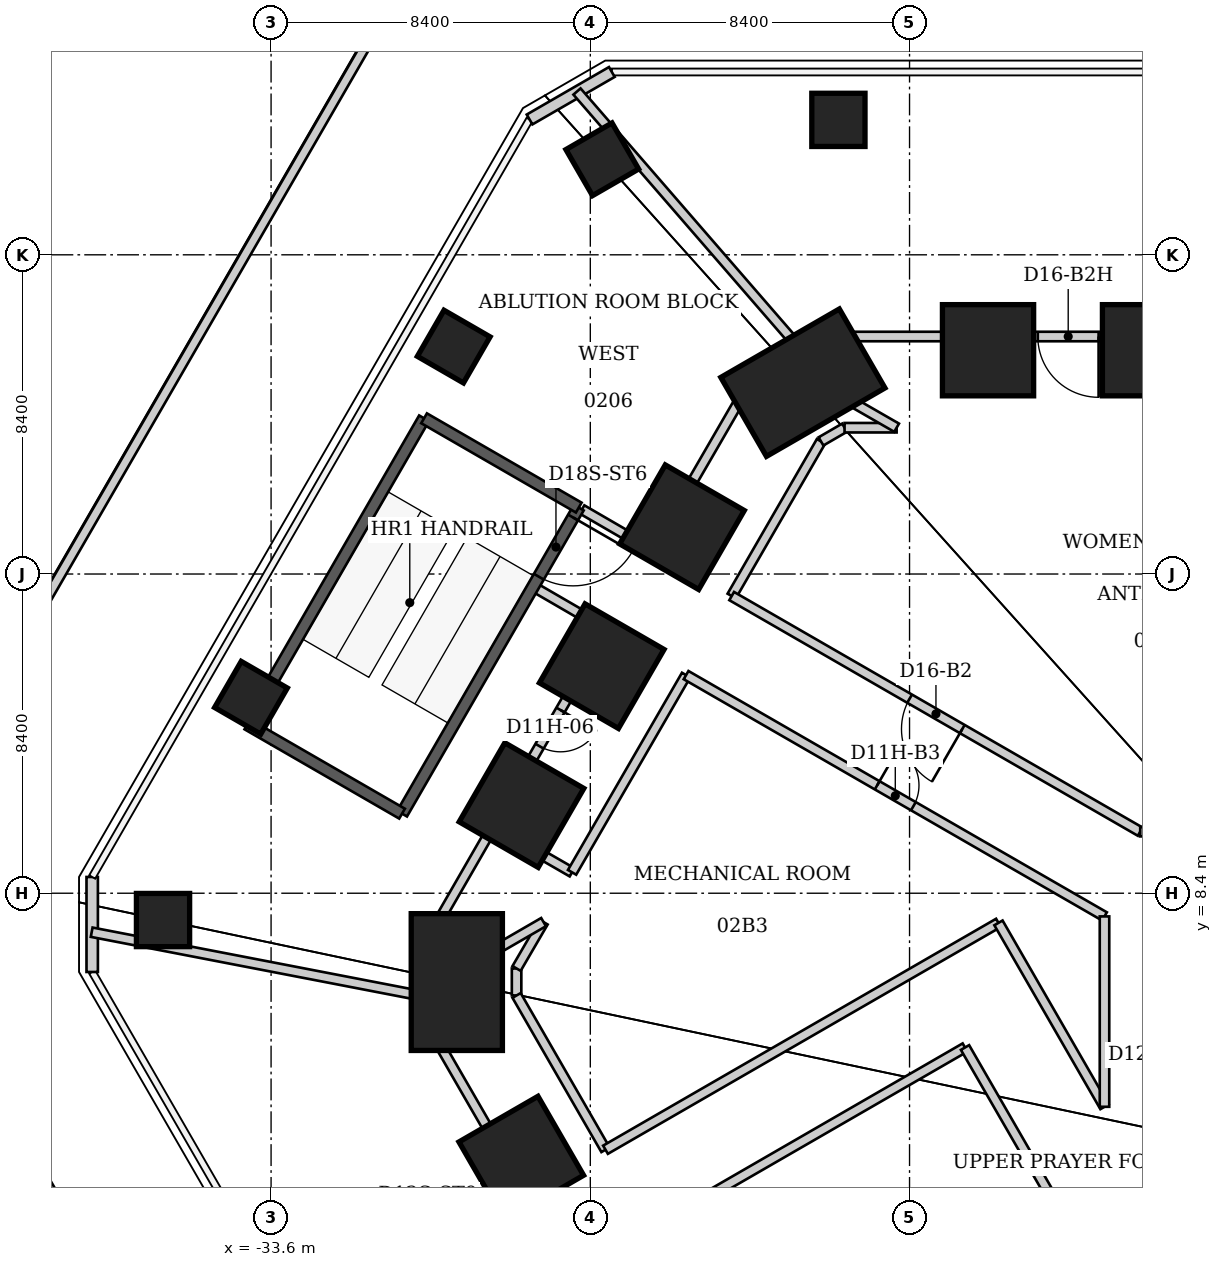
"""IFC4 building model, lengths in metres.
Left out: names, types, materials, properties, quantities, classifications, styles, units other than length and angle.
Written with IfcOpenShell. Run it as: python <this file> out.ifc"""

import sys

from ifc_helpers import new_model, si_unit, direction, frame, frame_2d, origin, origin_2d, place, context, subcontext, project, spatial, rectangle, extrude, element, fill, save


model = new_model("IFC4")
c1 = context("Model", 3, precision=1e-05, world=origin(), true_north=direction((0.0, 1.0)))
c2 = subcontext(c1, "Body", "Model", "MODEL_VIEW")
j1 = project(units=[si_unit("LENGTHUNIT", "METRE"), si_unit("PLANEANGLEUNIT", "RADIAN")], contexts=[c1])
p1 = place(None, origin())
s1 = spatial("IfcSite", under=j1, at=p1, CompositionType="ELEMENT")
p2 = place(p1, origin())
s2 = spatial("IfcBuilding", under=s1, at=p2, CompositionType="ELEMENT")
p3 = place(p2, frame((0.0, 0.0, 12.0)))
s3 = spatial("IfcBuildingStorey", under=s2, at=p3, CompositionType="ELEMENT", Elevation=12.0)
for number, where, z_axis, x_axis in (
    (1, (-14.735, 22.689, 0.0), (0.0, 0.0, 1.0), (0.0, 1.0, 0.0)),
    (2, (-10.525, 22.689, 0.0), (0.0, 0.0, 1.0), (0.0, 1.0, 0.0)),
    (3, (-27.016, 1.416, 0.0), (0.0, 0.0, 1.0), (-0.866, -0.5, 0.0)),
):
    element("IfcColumn", number, at=place(p3, frame(where, z_axis=z_axis, x_axis=x_axis)), inside=s3, PredefinedType="COLUMN", context=c2, shape_type="SweptSolid", body=[
        extrude(rectangle(XDim=2.4, YDim=2.4, at=origin_2d()), origin(), (0.0, 0.0, 1.0), 6.0),
    ])
p4 = place(p3, frame((-28.713, 6.062, 0.0), z_axis=(0.0, 0.0, 1.0), x_axis=(-1.0, 0.0, 0.0)))
e4 = element("IfcColumn", 4, at=p4, inside=s3, PredefinedType="COLUMN", context=c2, shape_type="SweptSolid", body=[
    extrude(rectangle(XDim=2.4, YDim=3.6, at=origin_2d()), origin(), (0.0, 0.0, 1.0), 6.0),
])
for number, where, z_axis, x_axis in (
    (5, (-27.01, 10.719, 0.0), (0.0, 0.0, 1.0), (-0.866, 0.5, 0.0)),
    (6, (-24.899, 14.375, 0.0), (0.0, 0.0, 1.0), (-0.866, 0.5, 0.0)),
    (7, (-22.788, 18.032, 0.0), (0.0, 0.0, 1.0), (-0.866, 0.5, 0.0)),
):
    element("IfcColumn", number, at=place(p3, frame(where, z_axis=z_axis, x_axis=x_axis)), inside=s3, PredefinedType="COLUMN", context=c2, shape_type="SweptSolid", body=[
        extrude(rectangle(XDim=2.4, YDim=2.4, at=origin_2d()), origin(), (0.0, 0.0, 1.0), 6.0),
    ])
p5 = place(p3, frame((-19.606, 21.835, 0.0), z_axis=(0.0, 0.0, 1.0), x_axis=(-0.5, 0.866025403784, 0.0)))
e8 = element("IfcColumn", 8, at=p5, inside=s3, PredefinedType="COLUMN", context=c2, shape_type="SweptSolid", body=[
    extrude(rectangle(XDim=2.4, YDim=3.6, at=origin_2d()), origin(), (0.0, 0.0, 1.0), 6.0),
])
for number, where, z_axis, x_axis in (
    (9, (-18.672, 28.751, 0.0), (0.0, 0.0, 1.0), (0.0, 1.0, 0.0)),
    (10, (-36.443, 7.694, 0.0), (0.0, 0.0, 1.0), (-1.0, 0.0, 0.0)),
    (11, (-34.129, 13.544, 0.0), (0.0, 0.0, 1.0), (-0.866, 0.5, 0.0)),
    (12, (-28.794, 22.785, 0.0), (0.0, 0.0, 1.0), (-0.866, 0.5, 0.0)),
    (13, (-24.885, 27.714, 0.0), (0.0, 0.0, 1.0), (-0.5, 0.866, 0.0)),
):
    element("IfcColumn", number, at=place(p3, frame(where, z_axis=z_axis, x_axis=x_axis)), inside=s3, PredefinedType="COLUMN", context=c2, shape_type="SweptSolid", body=[
        extrude(rectangle(XDim=1.4, YDim=1.4, at=origin_2d()), origin(), (0.0, 0.0, 1.0), 6.0),
    ])
p6 = place(p3, frame((-38.307, 6.328, 0.0), z_axis=(0.0, 0.0, 1.0), x_axis=(0.0, 1.0, 0.0)))
e14 = element("IfcWall", 14, at=p6, inside=s3, PredefinedType="SOLIDWALL", context=c2, shape_type="SweptSolid", body=[
    extrude(rectangle(XDim=2.5, YDim=0.3, at=frame_2d((1.25, 0.0))), origin(), (0.0, 0.0, 1.0), 5.6),
])
p7 = place(p3, frame((-26.799, 28.761, 0.0), z_axis=(0.0, 0.0, 1.0), x_axis=(0.866047370643, 0.499961950354, 0.0)))
e15 = element("IfcWall", 15, at=p7, inside=s3, PredefinedType="SOLIDWALL", context=c2, shape_type="SweptSolid", body=[
    extrude(rectangle(XDim=2.5, YDim=0.3, at=frame_2d((1.25, 0.0))), origin(), (0.0, 0.0, 1.0), 5.6),
])
p8 = place(p3, frame((-30.106, 32.438, 0.0), z_axis=(0.0, 0.0, 1.0), x_axis=(-0.500004465561, -0.866022825576, 0.0)))
e16 = element("IfcWall", 16, at=p8, inside=s3, PredefinedType="PARAPET", context=c2, shape_type="SweptSolid", body=[
    extrude(rectangle(XDim=26.078, YDim=0.25, at=frame_2d((13.039, 0.0))), origin(), (0.0, 0.0, 1.0), 1.1),
])
p9 = place(p3, frame((-43.144, 7.063, 0.0), z_axis=(0.0, 0.0, 1.0), x_axis=(0.500000660882, -0.866025022224, 0.0)))
e17 = element("IfcWall", 17, at=p9, inside=s3, PredefinedType="PARAPET", context=c2, shape_type="SweptSolid", body=[
    extrude(rectangle(XDim=55.377, YDim=0.25, at=frame_2d((27.688, 0.0))), origin(), (0.0, 0.0, 1.0), 1.1),
])
p10 = place(p3, frame((-38.321, 7.374, 0.0), z_axis=(0.0, 0.0, 1.0), x_axis=(0.981886490476, -0.189470102708, 0.0)))
e18 = element("IfcWall", 18, at=p10, inside=s3, PredefinedType="PARTITIONING", context=c2, shape_type="SweptSolid", body=[
    extrude(rectangle(XDim=8.942, YDim=0.25, at=frame_2d((4.471, 0.0))), origin(), (0.0, 0.0, 1.0), 5.6),
])
p11 = place(p3, frame((-29.54, 5.06, 0.0), z_axis=(0.0, 0.0, 1.0), x_axis=(0.499789957473, -0.866146637937, 0.0)))
e19 = element("IfcWall", 19, at=p11, inside=s3, PredefinedType="PARTITIONING", context=c2, shape_type="SweptSolid", body=[
    extrude(rectangle(XDim=5.323, YDim=0.25, at=frame_2d((2.661, 0.0))), origin(), (0.0, 0.0, 1.0), 4.04),
])
p12 = place(p3, frame((-29.54, 5.645, 0.0), z_axis=(0.0, 0.0, 1.0), x_axis=(0.0, -1.0, 0.0)))
e20 = element("IfcWall", 20, at=p12, inside=s3, PredefinedType="PARTITIONING", context=c2, shape_type="SweptSolid", body=[
    extrude(rectangle(XDim=0.585, YDim=0.25, at=frame_2d((0.292, 0.0))), origin(), (0.0, 0.0, 1.0), 5.84),
])
p13 = place(p3, frame((-29.54, 7.06, 0.0), z_axis=(0.0, 0.0, 1.0), x_axis=(0.0, -1.0, 0.0)))
e21 = element("IfcWall", 21, at=p13, inside=s3, PredefinedType="PARTITIONING", context=c2, shape_type="SweptSolid", body=[
    extrude(rectangle(XDim=1.22, YDim=0.25, at=frame_2d((0.61, 0.0))), origin(), (0.0, 0.0, 1.0), 5.84),
])
p14 = place(p3, frame((-27.76, 10.15, 0.0), z_axis=(0.0, 0.0, 1.0), x_axis=(-0.499181015942, -0.8664977284, 0.0)))
e22 = element("IfcWall", 22, at=p14, inside=s3, PredefinedType="PARTITIONING", context=c2, shape_type="SweptSolid", body=[
    extrude(rectangle(XDim=3.566, YDim=0.25, at=frame_2d((1.783, 0.0))), origin(), (0.0, 0.0, 1.0), 5.84),
])
p15 = place(p3, frame((-27.76, 10.15, 0.0), z_axis=(0.0, 0.0, 1.0), x_axis=(0.866202511239, -0.499693115345, 0.0)))
e23 = element("IfcWall", 23, at=p15, inside=s3, PredefinedType="PARTITIONING", context=c2, shape_type="SweptSolid", body=[
    extrude(rectangle(XDim=2.401, YDim=0.25, at=frame_2d((1.201, 0.0))), origin(), (0.0, 0.0, 1.0), 5.84),
])
p16 = place(p3, frame((-27.14, 5.71, 0.0), z_axis=(0.0, 0.0, 1.0), x_axis=(0.0, 1.0, 0.0)))
e24 = element("IfcWall", 24, at=p16, inside=s3, PredefinedType="PARTITIONING", context=c2, shape_type="SweptSolid", body=[
    extrude(rectangle(XDim=0.71, YDim=0.25, at=frame_2d((0.355, 0.0))), origin(), (0.0, 0.0, 1.0), 5.84),
])
p17 = place(p3, frame((-27.14, 6.42, 0.0), z_axis=(0.0, 0.0, 1.0), x_axis=(0.502902974743, 0.864342870622, 0.0)))
e25 = element("IfcWall", 25, at=p17, inside=s3, PredefinedType="PARTITIONING", context=c2, shape_type="SweptSolid", body=[
    extrude(rectangle(XDim=1.412, YDim=0.25, at=frame_2d((0.706, 0.0))), origin(), (0.0, 0.0, 1.0), 5.84),
])
p18 = place(p3, frame((-26.62, 16.42, 0.0), z_axis=(0.0, 0.0, 1.0), x_axis=(0.864835053767, -0.50205610222, 0.0)))
e26 = element("IfcWall", 26, at=p18, inside=s3, PredefinedType="PARTITIONING", context=c2, shape_type="SweptSolid", body=[
    extrude(rectangle(XDim=2.151, YDim=0.25, at=frame_2d((1.075, 0.0))), origin(), (0.0, 0.0, 1.0), 5.6),
])
p19 = place(p3, frame((-26.43, 7.64, 0.0), z_axis=(0.0, 0.0, 1.0), x_axis=(-0.865520854062, -0.500872889249, 0.0)))
e27 = element("IfcWall", 27, at=p19, inside=s3, PredefinedType="PARTITIONING", context=c2, shape_type="SweptSolid", body=[
    extrude(rectangle(XDim=3.593, YDim=0.25, at=frame_2d((1.797, 0.0))), origin(), (0.0, 0.0, 1.0), 5.84),
])
p20 = place(p3, frame((-25.68, 8.95, 0.0), z_axis=(0.0, 0.0, 1.0), x_axis=(0.50043093139, 0.865776462436, 0.0)))
e28 = element("IfcWall", 28, at=p20, inside=s3, PredefinedType="PARTITIONING", context=c2, shape_type="SweptSolid", body=[
    extrude(rectangle(XDim=5.995, YDim=0.25, at=frame_2d((2.998, 0.0))), origin(), (0.0, 0.0, 1.0), 5.84),
])
p21 = place(p3, frame((-24.8, 1.65, 0.0), z_axis=(0.0, 0.0, 1.0), x_axis=(-0.499361596599, 0.866393672555, 0.0)))
e29 = element("IfcWall", 29, at=p21, inside=s3, PredefinedType="PARTITIONING", context=c2, shape_type="SweptSolid", body=[
    extrude(rectangle(XDim=4.686, YDim=0.25, at=frame_2d((2.343, 0.0))), origin(), (0.0, 0.0, 1.0), 5.84),
])
p22 = place(p3, frame((-24.76, 15.34, 0.0), z_axis=(0.0, 0.0, 1.0), x_axis=(-0.50043093139, -0.865776462436, 0.0)))
e30 = element("IfcWall", 30, at=p22, inside=s3, PredefinedType="PARTITIONING", context=c2, shape_type="SweptSolid", body=[
    extrude(rectangle(XDim=5.995, YDim=0.25, at=frame_2d((2.998, 0.0))), origin(), (0.0, 0.0, 1.0), 4.04),
])
p23 = place(p22, frame((2.448, 0.0, 0.0)))
e31 = element("IfcOpeningElement", 31, at=p23, cuts=e30, PredefinedType="OPENING", context=c2, shape_type="SweptSolid", body=[
    extrude(rectangle(XDim=1.1, YDim=2.2, at=frame_2d((0.55, 1.1))), frame((0.0, 0.125, 0.0), z_axis=(0.0, -1.0, 0.0), x_axis=(1.0, 0.0, 0.0)), (0.0, 0.0, 1.0), 0.25),
])
p24 = place(p3, frame((-23.6, -0.43, 0.0), z_axis=(0.0, 0.0, 1.0), x_axis=(0.865975432538, 0.500086542752, 0.0)))
e32 = element("IfcWall", 32, at=p24, inside=s3, PredefinedType="PARTITIONING", context=c2, shape_type="SweptSolid", body=[
    extrude(rectangle(XDim=9.538, YDim=0.25, at=frame_2d((4.769, 0.0))), origin(), (0.0, 0.0, 1.0), 5.84),
])
p25 = place(p3, frame((-23.56, 17.42, 0.0), z_axis=(0.0, 0.0, 1.0), x_axis=(-0.864757143013, 0.502190286255, 0.0)))
e33 = element("IfcWall", 33, at=p25, inside=s3, PredefinedType="PARTITIONING", context=c2, shape_type="SweptSolid", body=[
    extrude(rectangle(XDim=2.151, YDim=0.25, at=frame_2d((1.075, 0.0))), origin(), (0.0, 0.0, 1.0), 5.6),
])
p26 = place(p3, frame((-22.68, 14.14, 0.0), z_axis=(0.0, 0.0, 1.0), x_axis=(0.866256251028, -0.499599947513, 0.0)))
e34 = element("IfcWall", 34, at=p26, inside=s3, PredefinedType="PARTITIONING", context=c2, shape_type="SweptSolid", body=[
    extrude(rectangle(XDim=12.71, YDim=0.25, at=frame_2d((6.355, 0.0))), origin(), (0.0, 0.0, 1.0), 5.84),
])
p27 = place(p26, frame((5.805, 0.0, 0.0)))
e35 = element("IfcOpeningElement", 35, at=p27, cuts=e34, PredefinedType="OPENING", context=c2, shape_type="SweptSolid", body=[
    extrude(rectangle(XDim=1.1, YDim=2.2, at=frame_2d((0.55, 1.1))), frame((0.0, 0.125, 0.0), z_axis=(0.0, -1.0, 0.0), x_axis=(1.0, 0.0, 0.0)), (0.0, 0.0, 1.0), 0.25),
])
p28 = place(p3, frame((-21.48, 16.22, 0.0), z_axis=(0.0, 0.0, 1.0), x_axis=(0.499999753078, 0.866025546345, 0.0)))
e36 = element("IfcWall", 36, at=p28, inside=s3, PredefinedType="PARTITIONING", context=c2, shape_type="SweptSolid", body=[
    extrude(rectangle(XDim=4.7, YDim=0.25, at=frame_2d((2.35, 0.0))), origin(), (0.0, 0.0, 1.0), 5.84),
])
p29 = place(p3, frame((-20.88, 22.05, 0.0), z_axis=(0.0, 0.0, 1.0), x_axis=(-0.50097690648, -0.86546065143, 0.0)))
e37 = element("IfcWall", 37, at=p29, inside=s3, PredefinedType="PARTITIONING", context=c2, shape_type="SweptSolid", body=[
    extrude(rectangle(XDim=5.35, YDim=0.25, at=frame_2d((2.675, 0.0))), origin(), (0.0, 0.0, 1.0), 4.04),
])
p30 = place(p3, frame((-20.23, 22.43, 0.0), z_axis=(0.0, 0.0, 1.0), x_axis=(-0.863331575042, -0.504637088942, 0.0)))
e38 = element("IfcWall", 38, at=p30, inside=s3, PredefinedType="PARTITIONING", context=c2, shape_type="SweptSolid", body=[
    extrude(rectangle(XDim=0.753, YDim=0.25, at=frame_2d((0.376, 0.0))), origin(), (0.0, 0.0, 1.0), 5.84),
])
p31 = place(p3, frame((-19.746, 22.708, 0.0), z_axis=(0.0, 0.0, 1.0), x_axis=(-0.867257505244, -0.49785983931, 0.0)))
e39 = element("IfcWall", 39, at=p31, inside=s3, PredefinedType="PARTITIONING", context=c2, shape_type="SweptSolid", body=[
    extrude(rectangle(XDim=0.443, YDim=0.25, at=frame_2d((0.221, 0.0))), origin(), (0.0, 0.0, 1.0), 5.84),
])
p32 = place(p3, frame((-19.69, 22.74, 0.0), z_axis=(0.0, 0.0, 1.0), x_axis=(-0.655186130594, 0.755467493859, 0.0)))
e40 = element("IfcWall", 40, at=p32, inside=s3, PredefinedType="PARTITIONING", context=c2, shape_type="SweptSolid", body=[
    extrude(rectangle(XDim=8.945, YDim=0.25, at=frame_2d((4.472, 0.0))), origin(), (0.0, 0.0, 1.0), 5.6),
])
p33 = place(p3, frame((-19.15, 23.05, 0.0), z_axis=(0.0, 0.0, 1.0), x_axis=(-0.867193315, -0.497971640175, 0.0)))
e41 = element("IfcWall", 41, at=p33, inside=s3, PredefinedType="PARTITIONING", context=c2, shape_type="SweptSolid", body=[
    extrude(rectangle(XDim=0.588, YDim=0.25, at=frame_2d((0.294, 0.0))), origin(), (0.0, 0.0, 1.0), 5.84),
])
p34 = place(p3, frame((-19.13, 20.29, 0.0), z_axis=(0.0, 0.0, 1.0), x_axis=(0.864827114446, 0.502069778138, 0.0)))
e42 = element("IfcWall", 42, at=p34, inside=s3, PredefinedType="PARTITIONING", context=c2, shape_type="SweptSolid", body=[
    extrude(rectangle(XDim=0.717, YDim=0.25, at=frame_2d((0.358, 0.0))), origin(), (0.0, 0.0, 1.0), 5.84),
])
p35 = place(p3, frame((-18.51, 20.65, 0.0), z_axis=(0.0, 0.0, 1.0), x_axis=(1.0, 0.0, 0.0)))
e43 = element("IfcWall", 43, at=p35, inside=s3, PredefinedType="PARTITIONING", context=c2, shape_type="SweptSolid", body=[
    extrude(rectangle(XDim=1.37, YDim=0.25, at=frame_2d((0.685, 0.0))), origin(), (0.0, 0.0, 1.0), 5.84),
])
p36 = place(p3, frame((-17.14, 20.65, 0.0), z_axis=(0.0, 0.0, 1.0), x_axis=(-0.866514787199, 0.49915140345, 0.0)))
e44 = element("IfcWall", 44, at=p36, inside=s3, PredefinedType="PARTITIONING", context=c2, shape_type="SweptSolid", body=[
    extrude(rectangle(XDim=3.566, YDim=0.25, at=frame_2d((1.783, 0.0))), origin(), (0.0, 0.0, 1.0), 5.84),
])
p37 = place(p3, frame((-15.34, 4.34, 0.0), z_axis=(0.0, 0.0, 1.0), x_axis=(0.499811677007, -0.866134104817, 0.0)))
e45 = element("IfcWall", 45, at=p37, inside=s3, PredefinedType="PARTITIONING", context=c2, shape_type="SweptSolid", body=[
    extrude(rectangle(XDim=7.343, YDim=0.25, at=frame_2d((3.671, 0.0))), origin(), (0.0, 0.0, 1.0), 5.84),
])
p38 = place(p3, frame((-14.46, 7.62, 0.0), z_axis=(0.0, 0.0, 1.0), x_axis=(-0.866012263686, -0.500022758628, 0.0)))
e46 = element("IfcWall", 46, at=p38, inside=s3, PredefinedType="PARTITIONING", context=c2, shape_type="SweptSolid", body=[
    extrude(rectangle(XDim=11.94, YDim=0.25, at=frame_2d((5.97, 0.0))), origin(), (0.0, 0.0, 1.0), 5.84),
])
p39 = place(p3, frame((-11.67, 2.78, 0.0), z_axis=(0.0, 0.0, 1.0), x_axis=(-0.49941093891, 0.866365231353, 0.0)))
e47 = element("IfcWall", 47, at=p39, inside=s3, PredefinedType="PARTITIONING", context=c2, shape_type="SweptSolid", body=[
    extrude(rectangle(XDim=5.587, YDim=0.25, at=frame_2d((2.793, 0.0))), origin(), (0.0, 0.0, 1.0), 5.84),
])
p40 = place(p3, frame((-11.67, 7.79, 0.0), z_axis=(0.0, 0.0, 1.0), x_axis=(0.0, -1.0, 0.0)))
e48 = element("IfcWall", 48, at=p40, inside=s3, PredefinedType="PARTITIONING", context=c2, shape_type="SweptSolid", body=[
    extrude(rectangle(XDim=5.01, YDim=0.25, at=frame_2d((2.505, 0.0))), origin(), (0.0, 0.0, 1.0), 5.84),
])
p41 = place(p3, frame((-10.73, 10.02, 0.0), z_axis=(0.0, 0.0, 1.0), x_axis=(-0.866254357941, 0.499603229922, 0.0)))
e49 = element("IfcWall", 49, at=p41, inside=s3, PredefinedType="PARTITIONING", context=c2, shape_type="SweptSolid", body=[
    extrude(rectangle(XDim=12.41, YDim=0.25, at=frame_2d((6.205, 0.0))), origin(), (0.0, 0.0, 1.0), 5.84),
])
p42 = place(p41, frame((5.405, 0.0, 0.0)))
e50 = element("IfcOpeningElement", 50, at=p42, cuts=e49, PredefinedType="OPENING", context=c2, shape_type="SweptSolid", body=[
    extrude(rectangle(XDim=1.6, YDim=2.4, at=frame_2d((0.8, 1.2))), frame((0.0, 0.125, 0.0), z_axis=(0.0, -1.0, 0.0), x_axis=(1.0, 0.0, 0.0)), (0.0, 0.0, 1.0), 0.25),
])
p43 = place(p3, frame((-4.0, 10.02, 0.0), z_axis=(0.0, 0.0, 1.0), x_axis=(-1.0, 0.0, 0.0)))
e51 = element("IfcWall", 51, at=p43, inside=s3, PredefinedType="PARTITIONING", context=c2, shape_type="SweptSolid", body=[
    extrude(rectangle(XDim=6.73, YDim=0.25, at=frame_2d((3.365, 0.0))), origin(), (0.0, 0.0, 1.0), 5.84),
])
p44 = place(p3, frame((-4.0, 23.05, 0.0), z_axis=(0.0, 0.0, 1.0), x_axis=(-1.0, 0.0, 0.0)))
e52 = element("IfcWall", 52, at=p44, inside=s3, PredefinedType="PARTITIONING", context=c2, shape_type="SweptSolid", body=[
    extrude(rectangle(XDim=15.15, YDim=0.25, at=frame_2d((7.575, 0.0))), origin(), (0.0, 0.0, 1.0), 4.04),
])
p45 = place(p44, frame((7.825, 0.0, 0.0)))
e53 = element("IfcOpeningElement", 53, at=p45, cuts=e52, PredefinedType="OPENING", context=c2, shape_type="SweptSolid", body=[
    extrude(rectangle(XDim=1.6, YDim=2.4, at=frame_2d((0.8, 1.2))), frame((0.0, 0.125, 0.0), z_axis=(0.0, -1.0, 0.0), x_axis=(1.0, 0.0, 0.0)), (0.0, 0.0, 1.0), 0.25),
])
p46 = place(p3, frame((-25.504, 18.548, 0.0), z_axis=(0.0, 0.0, 1.0), x_axis=(-0.500004225487, -0.866022964185, 0.0)))
e54 = element("IfcWall", 54, at=p46, inside=s3, PredefinedType="SHEAR", context=c2, shape_type="SweptSolid", body=[
    extrude(rectangle(XDim=9.3, YDim=0.3, at=frame_2d((4.65, 0.0))), origin(), (0.0, 0.0, 1.0), 6.0),
])
p47 = place(p46, frame((0.3, 0.0, 0.0)))
e55 = element("IfcOpeningElement", 55, at=p47, cuts=e54, PredefinedType="OPENING", context=c2, shape_type="SweptSolid", body=[
    extrude(rectangle(XDim=1.8, YDim=2.4, at=frame_2d((0.9, 1.2))), frame((0.0, 0.15, 0.0), z_axis=(0.0, -1.0, 0.0), x_axis=(1.0, 0.0, 0.0)), (0.0, 0.0, 1.0), 0.3),
])
p48 = place(p3, frame((-30.154, 10.494, 0.0), z_axis=(0.0, 0.0, 1.0), x_axis=(-0.866016039709, 0.500016218704, 0.0)))
e56 = element("IfcWall", 56, at=p48, inside=s3, PredefinedType="SHEAR", context=c2, shape_type="SweptSolid", body=[
    extrude(rectangle(XDim=4.7, YDim=0.3, at=frame_2d((2.35, 0.0))), origin(), (0.0, 0.0, 1.0), 6.0),
])
p49 = place(p3, frame((-34.224, 12.844, 0.0), z_axis=(0.0, 0.0, 1.0), x_axis=(0.500015592816, 0.866016401081, 0.0)))
e57 = element("IfcWall", 57, at=p49, inside=s3, PredefinedType="SHEAR", context=c2, shape_type="SweptSolid", body=[
    extrude(rectangle(XDim=9.3, YDim=0.3, at=frame_2d((4.65, 0.0))), origin(), (0.0, 0.0, 1.0), 6.0),
])
p50 = place(p3, frame((-29.574, 20.898, 0.0), z_axis=(0.0, 0.0, 1.0), x_axis=(0.866038532462, -0.499977259774, 0.0)))
e58 = element("IfcWall", 58, at=p50, inside=s3, PredefinedType="SHEAR", context=c2, shape_type="SweptSolid", body=[
    extrude(rectangle(XDim=4.7, YDim=0.3, at=frame_2d((2.35, 0.0))), origin(), (0.0, 0.0, 1.0), 6.0),
])
p51 = place(p23, origin())
e59 = element("IfcDoor", 59, at=p51, inside=s3, OperationType="SINGLE_SWING_LEFT", PredefinedType="DOOR", context=c2, shape_type="SweptSolid", body=[
    extrude(rectangle(XDim=1.1, YDim=2.2, at=frame_2d((0.55, 1.1))), frame((0.0, 0.025, 0.0), z_axis=(0.0, -1.0, 0.0), x_axis=(1.0, 0.0, 0.0)), (0.0, 0.0, 1.0), 0.05),
])
fill(e31, e59)
p52 = place(p42, origin())
e60 = element("IfcDoor", 60, at=p52, inside=s3, OperationType="DOUBLE_DOOR_SINGLE_SWING", PredefinedType="DOOR", context=c2, shape_type="SweptSolid", body=[
    extrude(rectangle(XDim=1.6, YDim=2.4, at=frame_2d((0.8, 1.2))), frame((0.0, 0.025, 0.0), z_axis=(0.0, -1.0, 0.0), x_axis=(1.0, 0.0, 0.0)), (0.0, 0.0, 1.0), 0.05),
])
fill(e50, e60)
p53 = place(p27, origin())
e61 = element("IfcDoor", 61, at=p53, inside=s3, OperationType="SINGLE_SWING_LEFT", PredefinedType="DOOR", context=c2, shape_type="SweptSolid", body=[
    extrude(rectangle(XDim=1.1, YDim=2.2, at=frame_2d((0.55, 1.1))), frame((0.0, 0.025, 0.0), z_axis=(0.0, -1.0, 0.0), x_axis=(1.0, 0.0, 0.0)), (0.0, 0.0, 1.0), 0.05),
])
fill(e35, e61)
p54 = place(p45, origin())
e62 = element("IfcDoor", 62, at=p54, inside=s3, OperationType="DOUBLE_DOOR_SINGLE_SWING", PredefinedType="DOOR", context=c2, shape_type="SweptSolid", body=[
    extrude(rectangle(XDim=1.6, YDim=2.4, at=frame_2d((0.8, 1.2))), frame((0.0, 0.025, 0.0), z_axis=(0.0, -1.0, 0.0), x_axis=(1.0, 0.0, 0.0)), (0.0, 0.0, 1.0), 0.05),
])
fill(e53, e62)
p55 = place(p47, origin())
e63 = element("IfcDoor", 63, at=p55, inside=s3, OperationType="DOUBLE_DOOR_SINGLE_SWING", PredefinedType="DOOR", context=c2, shape_type="SweptSolid", body=[
    extrude(rectangle(XDim=1.8, YDim=2.4, at=frame_2d((0.9, 1.2))), frame((0.0, 0.025, 0.0), z_axis=(0.0, -1.0, 0.0), x_axis=(1.0, 0.0, 0.0)), (0.0, 0.0, 1.0), 0.05),
])
fill(e55, e63)
save(model, sys.argv[1])
